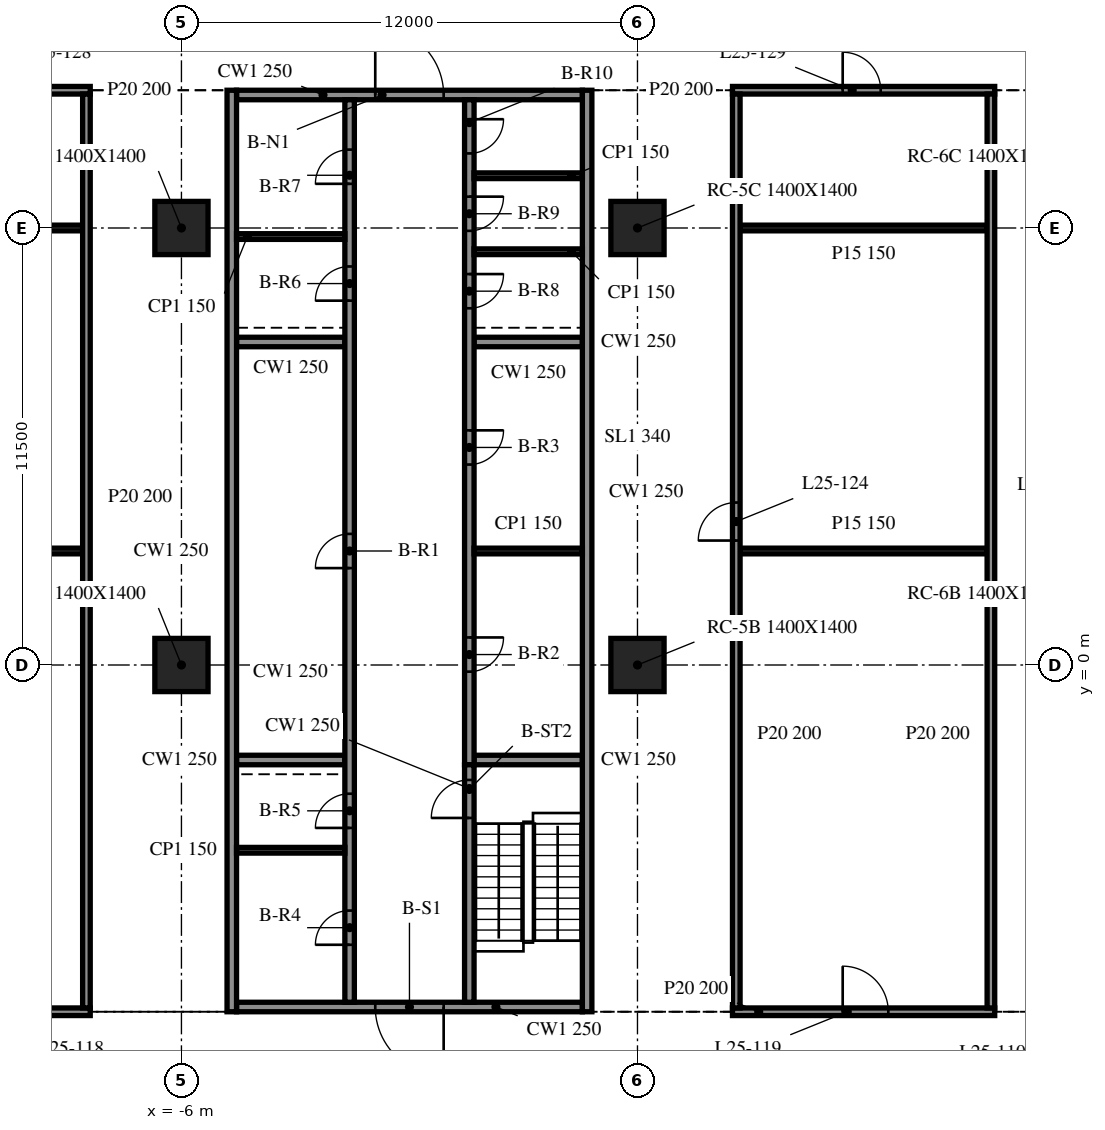
"""IFC4 building model, lengths in metres.
Left out: names, types, materials, properties, quantities, classifications, styles, units other than length and angle.
Written with IfcOpenShell. Run it as: python <this file> out.ifc"""

import sys

from ifc_helpers import new_model, si_unit, direction, frame, frame_2d, origin, origin_2d, place, context, subcontext, project, spatial, rectangle, extrude, element, fill, save


model = new_model("IFC4")
c1 = context("Model", 3, precision=1e-05, world=origin(), true_north=direction((0.0, 1.0)))
c2 = subcontext(c1, "Body", "Model", "MODEL_VIEW")
j1 = project(units=[si_unit("LENGTHUNIT", "METRE"), si_unit("PLANEANGLEUNIT", "RADIAN")], contexts=[c1])
p1 = place(None, origin())
s1 = spatial("IfcSite", under=j1, at=p1, CompositionType="ELEMENT")
p2 = place(p1, origin())
s2 = spatial("IfcBuilding", under=s1, at=p2, CompositionType="ELEMENT")
p3 = place(p2, frame((0.0, 0.0, 109.4)))
s3 = spatial("IfcBuildingStorey", under=s2, at=p3, CompositionType="ELEMENT", Elevation=109.4)
for number, where, z_axis, x_axis in (
    (1, (-6.0, 0.0, -0.34), (0.0, 0.0, 1.0), (1.0, 0.0, 0.0)),
    (2, (-6.0, 11.5, -0.34), (0.0, 0.0, 1.0), (1.0, 0.0, 0.0)),
    (3, (6.0, 0.0, -0.34), (0.0, 0.0, 1.0), (1.0, 0.0, 0.0)),
    (4, (6.0, 11.5, -0.34), (0.0, 0.0, 1.0), (1.0, 0.0, 0.0)),
):
    element("IfcColumn", number, at=place(p3, frame(where, z_axis=z_axis, x_axis=x_axis)), inside=s3, PredefinedType="COLUMN", context=c2, shape_type="SweptSolid", body=[
        extrude(rectangle(XDim=1.4, YDim=1.4, at=origin_2d()), origin(), (0.0, 0.0, 1.0), 4.1),
    ])
for number, where, z_axis, x_axis in (
    (5, (-4.675, 15.125, 0.0), (0.0, 0.0, 1.0), (0.0, -1.0, 0.0)),
    (6, (4.675, -9.125, 0.0), (0.0, 0.0, 1.0), (0.0, 1.0, 0.0)),
):
    element("IfcWall", number, at=place(p3, frame(where, z_axis=z_axis, x_axis=x_axis)), inside=s3, PredefinedType="SOLIDWALL", context=c2, shape_type="SweptSolid", body=[
        extrude(rectangle(XDim=24.25, YDim=0.25, at=frame_2d((12.125, 0.0))), origin(), (0.0, 0.0, 1.0), 3.76),
    ])
p4 = place(p3, frame((4.55, -9.0, 0.0), z_axis=(0.0, 0.0, 1.0), x_axis=(-1.0, 0.0, 0.0)))
e7 = element("IfcWall", 7, at=p4, inside=s3, PredefinedType="SOLIDWALL", context=c2, shape_type="SweptSolid", body=[
    extrude(rectangle(XDim=9.1, YDim=0.25, at=frame_2d((4.55, 0.0))), origin(), (0.0, 0.0, 1.0), 3.76),
])
p5 = place(p4, frame((3.65, 0.0, 0.0)))
e8 = element("IfcOpeningElement", 8, at=p5, cuts=e7, PredefinedType="OPENING", context=c2, shape_type="SweptSolid", body=[
    extrude(rectangle(XDim=1.8, YDim=2.1, at=frame_2d((0.9, 1.05))), frame((0.0, 0.135, 0.0), z_axis=(0.0, -1.0, 0.0), x_axis=(1.0, 0.0, 0.0)), (0.0, 0.0, 1.0), 0.27),
])
p6 = place(p3, frame((-4.55, 15.0, 0.0), z_axis=(0.0, 0.0, 1.0), x_axis=(1.0, 0.0, 0.0)))
e9 = element("IfcWall", 9, at=p6, inside=s3, PredefinedType="SOLIDWALL", context=c2, shape_type="SweptSolid", body=[
    extrude(rectangle(XDim=9.1, YDim=0.25, at=frame_2d((4.55, 0.0))), origin(), (0.0, 0.0, 1.0), 3.76),
])
p7 = place(p6, frame((3.65, 0.0, 0.0)))
e10 = element("IfcOpeningElement", 10, at=p7, cuts=e9, PredefinedType="OPENING", context=c2, shape_type="SweptSolid", body=[
    extrude(rectangle(XDim=1.8, YDim=2.1, at=frame_2d((0.9, 1.05))), frame((0.0, 0.135, 0.0), z_axis=(0.0, -1.0, 0.0), x_axis=(1.0, 0.0, 0.0)), (0.0, 0.0, 1.0), 0.27),
])
p8 = place(p3, frame((-1.575, -8.875, 0.0), z_axis=(0.0, 0.0, 1.0), x_axis=(0.0, 1.0, 0.0)))
e11 = element("IfcWall", 11, at=p8, inside=s3, PredefinedType="SOLIDWALL", context=c2, shape_type="SweptSolid", body=[
    extrude(rectangle(XDim=23.75, YDim=0.25, at=frame_2d((11.875, 0.0))), origin(), (0.0, 0.0, 1.0), 3.76),
])
p9 = place(p8, frame((11.425, 0.0, 0.0)))
e12 = element("IfcOpeningElement", 12, at=p9, cuts=e11, PredefinedType="OPENING", context=c2, shape_type="SweptSolid", body=[
    extrude(rectangle(XDim=0.9, YDim=2.1, at=frame_2d((0.45, 1.05))), frame((0.0, 0.135, 0.0), z_axis=(0.0, -1.0, 0.0), x_axis=(1.0, 0.0, 0.0)), (0.0, 0.0, 1.0), 0.27),
])
p10 = place(p8, frame((1.512, 0.0, 0.0)))
e13 = element("IfcOpeningElement", 13, at=p10, cuts=e11, PredefinedType="OPENING", context=c2, shape_type="SweptSolid", body=[
    extrude(rectangle(XDim=0.9, YDim=2.1, at=frame_2d((0.45, 1.05))), frame((0.0, 0.135, 0.0), z_axis=(0.0, -1.0, 0.0), x_axis=(1.0, 0.0, 0.0)), (0.0, 0.0, 1.0), 0.27),
])
p11 = place(p8, frame((4.587, 0.0, 0.0)))
e14 = element("IfcOpeningElement", 14, at=p11, cuts=e11, PredefinedType="OPENING", context=c2, shape_type="SweptSolid", body=[
    extrude(rectangle(XDim=0.9, YDim=2.1, at=frame_2d((0.45, 1.05))), frame((0.0, 0.135, 0.0), z_axis=(0.0, -1.0, 0.0), x_axis=(1.0, 0.0, 0.0)), (0.0, 0.0, 1.0), 0.27),
])
p12 = place(p8, frame((18.462, 0.0, 0.0)))
e15 = element("IfcOpeningElement", 15, at=p12, cuts=e11, PredefinedType="OPENING", context=c2, shape_type="SweptSolid", body=[
    extrude(rectangle(XDim=0.9, YDim=2.1, at=frame_2d((0.45, 1.05))), frame((0.0, 0.135, 0.0), z_axis=(0.0, -1.0, 0.0), x_axis=(1.0, 0.0, 0.0)), (0.0, 0.0, 1.0), 0.27),
])
p13 = place(p8, frame((21.538, 0.0, 0.0)))
e16 = element("IfcOpeningElement", 16, at=p13, cuts=e11, PredefinedType="OPENING", context=c2, shape_type="SweptSolid", body=[
    extrude(rectangle(XDim=0.9, YDim=2.1, at=frame_2d((0.45, 1.05))), frame((0.0, 0.135, 0.0), z_axis=(0.0, -1.0, 0.0), x_axis=(1.0, 0.0, 0.0)), (0.0, 0.0, 1.0), 0.27),
])
p14 = place(p3, frame((1.575, -8.875, 0.0), z_axis=(0.0, 0.0, 1.0), x_axis=(0.0, 1.0, 0.0)))
e17 = element("IfcWall", 17, at=p14, inside=s3, PredefinedType="SOLIDWALL", context=c2, shape_type="SweptSolid", body=[
    extrude(rectangle(XDim=6.25, YDim=0.25, at=frame_2d((3.125, 0.0))), origin(), (0.0, 0.0, 1.0), 3.76),
])
p15 = place(p14, frame((4.85, 0.0, 0.0)))
e18 = element("IfcOpeningElement", 18, at=p15, cuts=e17, PredefinedType="OPENING", context=c2, shape_type="SweptSolid", body=[
    extrude(rectangle(XDim=1.0, YDim=2.1, at=frame_2d((0.5, 1.05))), frame((0.0, 0.135, 0.0), z_axis=(0.0, -1.0, 0.0), x_axis=(1.0, 0.0, 0.0)), (0.0, 0.0, 1.0), 0.27),
])
p16 = place(p3, frame((1.575, 14.875, 0.0), z_axis=(0.0, 0.0, 1.0), x_axis=(0.0, -1.0, 0.0)))
e19 = element("IfcWall", 19, at=p16, inside=s3, PredefinedType="SOLIDWALL", context=c2, shape_type="SweptSolid", body=[
    extrude(rectangle(XDim=17.5, YDim=0.25, at=frame_2d((8.75, 0.0))), origin(), (0.0, 0.0, 1.0), 3.76),
])
p17 = place(p16, frame((14.15, 0.0, 0.0)))
e20 = element("IfcOpeningElement", 20, at=p17, cuts=e19, PredefinedType="OPENING", context=c2, shape_type="SweptSolid", body=[
    extrude(rectangle(XDim=0.9, YDim=2.1, at=frame_2d((0.45, 1.05))), frame((0.0, 0.135, 0.0), z_axis=(0.0, -1.0, 0.0), x_axis=(1.0, 0.0, 0.0)), (0.0, 0.0, 1.0), 0.27),
])
p18 = place(p16, frame((8.7, 0.0, 0.0)))
e21 = element("IfcOpeningElement", 21, at=p18, cuts=e19, PredefinedType="OPENING", context=c2, shape_type="SweptSolid", body=[
    extrude(rectangle(XDim=0.9, YDim=2.1, at=frame_2d((0.45, 1.05))), frame((0.0, 0.135, 0.0), z_axis=(0.0, -1.0, 0.0), x_axis=(1.0, 0.0, 0.0)), (0.0, 0.0, 1.0), 0.27),
])
p19 = place(p16, frame((4.587, 0.0, 0.0)))
e22 = element("IfcOpeningElement", 22, at=p19, cuts=e19, PredefinedType="OPENING", context=c2, shape_type="SweptSolid", body=[
    extrude(rectangle(XDim=0.9, YDim=2.1, at=frame_2d((0.45, 1.05))), frame((0.0, 0.135, 0.0), z_axis=(0.0, -1.0, 0.0), x_axis=(1.0, 0.0, 0.0)), (0.0, 0.0, 1.0), 0.27),
])
p20 = place(p16, frame((2.55, 0.0, 0.0)))
e23 = element("IfcOpeningElement", 23, at=p20, cuts=e19, PredefinedType="OPENING", context=c2, shape_type="SweptSolid", body=[
    extrude(rectangle(XDim=0.9, YDim=2.1, at=frame_2d((0.45, 1.05))), frame((0.0, 0.135, 0.0), z_axis=(0.0, -1.0, 0.0), x_axis=(1.0, 0.0, 0.0)), (0.0, 0.0, 1.0), 0.27),
])
p21 = place(p16, frame((0.512, 0.0, 0.0)))
e24 = element("IfcOpeningElement", 24, at=p21, cuts=e19, PredefinedType="OPENING", context=c2, shape_type="SweptSolid", body=[
    extrude(rectangle(XDim=0.9, YDim=2.1, at=frame_2d((0.45, 1.05))), frame((0.0, 0.135, 0.0), z_axis=(0.0, -1.0, 0.0), x_axis=(1.0, 0.0, 0.0)), (0.0, 0.0, 1.0), 0.27),
])
for number, where, z_axis, x_axis in (
    (25, (-4.55, -2.5, 0.0), (0.0, 0.0, 1.0), (1.0, 0.0, 0.0)),
    (26, (-4.55, 8.5, 0.0), (0.0, 0.0, 1.0), (1.0, 0.0, 0.0)),
    (27, (1.7, -2.5, 0.0), (0.0, 0.0, 1.0), (1.0, 0.0, 0.0)),
    (28, (1.7, 8.5, 0.0), (0.0, 0.0, 1.0), (1.0, 0.0, 0.0)),
):
    element("IfcWall", number, at=place(p3, frame(where, z_axis=z_axis, x_axis=x_axis)), inside=s3, PredefinedType="SOLIDWALL", context=c2, shape_type="SweptSolid", body=[
        extrude(rectangle(XDim=2.85, YDim=0.25, at=frame_2d((1.425, 0.0))), origin(), (0.0, 0.0, 1.0), 3.76),
    ])
for number, where, z_axis, x_axis in (
    (29, (1.7, 3.0, 0.0), (0.0, 0.0, 1.0), (1.0, 0.0, 0.0)),
    (30, (-4.55, -4.875, 0.0), (0.0, 0.0, 1.0), (1.0, 0.0, 0.0)),
    (31, (-4.55, 11.275, 0.0), (0.0, 0.0, 1.0), (1.0, 0.0, 0.0)),
    (32, (1.7, 10.875, 0.0), (0.0, 0.0, 1.0), (1.0, 0.0, 0.0)),
    (33, (1.7, 12.875, 0.0), (0.0, 0.0, 1.0), (1.0, 0.0, 0.0)),
):
    element("IfcWall", number, at=place(p3, frame(where, z_axis=z_axis, x_axis=x_axis)), inside=s3, PredefinedType="PARTITIONING", context=c2, shape_type="SweptSolid", body=[
        extrude(rectangle(XDim=2.85, YDim=0.15, at=frame_2d((1.425, 0.0))), origin(), (0.0, 0.0, 1.0), 3.76),
    ])
p22 = place(p3, frame((-15.7, -9.125, 0.0), z_axis=(0.0, 0.0, 1.0), x_axis=(1.0, 0.0, 0.0)))
e34 = element("IfcWall", 34, at=p22, inside=s3, PredefinedType="PARTITIONING", context=c2, shape_type="SweptSolid", body=[
    extrude(rectangle(XDim=7.3, YDim=0.2, at=frame_2d((3.65, 0.0))), origin(), (0.0, 0.0, 1.0), 3.76),
])
p23 = place(p22, frame((3.1, 0.0, 0.0)))
e35 = element("IfcOpeningElement", 35, at=p23, cuts=e34, PredefinedType="OPENING", context=c2, shape_type="SweptSolid", body=[
    extrude(rectangle(XDim=1.2, YDim=2.1, at=frame_2d((0.6, 1.05))), frame((0.0, 0.11, 0.0), z_axis=(0.0, -1.0, 0.0), x_axis=(1.0, 0.0, 0.0)), (0.0, 0.0, 1.0), 0.22),
])
p24 = place(p3, frame((8.5, -9.125, 0.0), z_axis=(0.0, 0.0, 1.0), x_axis=(1.0, 0.0, 0.0)))
e36 = element("IfcWall", 36, at=p24, inside=s3, PredefinedType="PARTITIONING", context=c2, shape_type="SweptSolid", body=[
    extrude(rectangle(XDim=6.9, YDim=0.2, at=frame_2d((3.45, 0.0))), origin(), (0.0, 0.0, 1.0), 3.76),
])
p25 = place(p24, frame((2.9, 0.0, 0.0)))
e37 = element("IfcOpeningElement", 37, at=p25, cuts=e36, PredefinedType="OPENING", context=c2, shape_type="SweptSolid", body=[
    extrude(rectangle(XDim=1.2, YDim=2.1, at=frame_2d((0.6, 1.05))), frame((0.0, 0.11, 0.0), z_axis=(0.0, -1.0, 0.0), x_axis=(1.0, 0.0, 0.0)), (0.0, 0.0, 1.0), 0.22),
])
p26 = place(p3, frame((-15.5, 3.0, 0.0), z_axis=(0.0, 0.0, 1.0), x_axis=(1.0, 0.0, 0.0)))
e38 = element("IfcWall", 38, at=p26, inside=s3, PredefinedType="PARTITIONING", context=c2, shape_type="SweptSolid", body=[
    extrude(rectangle(XDim=6.9, YDim=0.15, at=frame_2d((3.45, 0.0))), origin(), (0.0, 0.0, 1.0), 3.76),
])
p27 = place(p3, frame((8.7, 3.0, 0.0), z_axis=(0.0, 0.0, 1.0), x_axis=(1.0, 0.0, 0.0)))
e39 = element("IfcWall", 39, at=p27, inside=s3, PredefinedType="PARTITIONING", context=c2, shape_type="SweptSolid", body=[
    extrude(rectangle(XDim=6.5, YDim=0.15, at=frame_2d((3.25, 0.0))), origin(), (0.0, 0.0, 1.0), 3.76),
])
p28 = place(p3, frame((-15.5, 11.5, 0.0), z_axis=(0.0, 0.0, 1.0), x_axis=(1.0, 0.0, 0.0)))
e40 = element("IfcWall", 40, at=p28, inside=s3, PredefinedType="PARTITIONING", context=c2, shape_type="SweptSolid", body=[
    extrude(rectangle(XDim=6.9, YDim=0.15, at=frame_2d((3.45, 0.0))), origin(), (0.0, 0.0, 1.0), 3.76),
])
p29 = place(p3, frame((8.7, 11.5, 0.0), z_axis=(0.0, 0.0, 1.0), x_axis=(1.0, 0.0, 0.0)))
e41 = element("IfcWall", 41, at=p29, inside=s3, PredefinedType="PARTITIONING", context=c2, shape_type="SweptSolid", body=[
    extrude(rectangle(XDim=6.5, YDim=0.15, at=frame_2d((3.25, 0.0))), origin(), (0.0, 0.0, 1.0), 3.76),
])
p30 = place(p3, frame((-15.7, 15.125, 0.0), z_axis=(0.0, 0.0, 1.0), x_axis=(1.0, 0.0, 0.0)))
e42 = element("IfcWall", 42, at=p30, inside=s3, PredefinedType="PARTITIONING", context=c2, shape_type="SweptSolid", body=[
    extrude(rectangle(XDim=7.3, YDim=0.2, at=frame_2d((3.65, 0.0))), origin(), (0.0, 0.0, 1.0), 3.76),
])
p31 = place(p30, frame((3.1, 0.0, 0.0)))
e43 = element("IfcOpeningElement", 43, at=p31, cuts=e42, PredefinedType="OPENING", context=c2, shape_type="SweptSolid", body=[
    extrude(rectangle(XDim=1.0, YDim=2.1, at=frame_2d((0.5, 1.05))), frame((0.0, 0.11, 0.0), z_axis=(0.0, -1.0, 0.0), x_axis=(1.0, 0.0, 0.0)), (0.0, 0.0, 1.0), 0.22),
])
p32 = place(p3, frame((8.5, 15.125, 0.0), z_axis=(0.0, 0.0, 1.0), x_axis=(1.0, 0.0, 0.0)))
e44 = element("IfcWall", 44, at=p32, inside=s3, PredefinedType="PARTITIONING", context=c2, shape_type="SweptSolid", body=[
    extrude(rectangle(XDim=6.9, YDim=0.2, at=frame_2d((3.45, 0.0))), origin(), (0.0, 0.0, 1.0), 3.76),
])
p33 = place(p32, frame((2.9, 0.0, 0.0)))
e45 = element("IfcOpeningElement", 45, at=p33, cuts=e44, PredefinedType="OPENING", context=c2, shape_type="SweptSolid", body=[
    extrude(rectangle(XDim=1.0, YDim=2.1, at=frame_2d((0.5, 1.05))), frame((0.0, 0.11, 0.0), z_axis=(0.0, -1.0, 0.0), x_axis=(1.0, 0.0, 0.0)), (0.0, 0.0, 1.0), 0.22),
])
p34 = place(p3, frame((-8.5, -9.025, 0.0), z_axis=(0.0, 0.0, 1.0), x_axis=(0.0, 1.0, 0.0)))
e46 = element("IfcWall", 46, at=p34, inside=s3, PredefinedType="PARTITIONING", context=c2, shape_type="SweptSolid", body=[
    extrude(rectangle(XDim=24.05, YDim=0.2, at=frame_2d((12.025, 0.0))), origin(), (0.0, 0.0, 1.0), 3.76),
])
p35 = place(p3, frame((8.6, -9.025, 0.0), z_axis=(0.0, 0.0, 1.0), x_axis=(0.0, 1.0, 0.0)))
e47 = element("IfcWall", 47, at=p35, inside=s3, PredefinedType="PARTITIONING", context=c2, shape_type="SweptSolid", body=[
    extrude(rectangle(XDim=24.05, YDim=0.2, at=frame_2d((12.025, 0.0))), origin(), (0.0, 0.0, 1.0), 3.76),
])
p36 = place(p35, frame((12.3, 0.0, 0.0)))
e48 = element("IfcOpeningElement", 48, at=p36, cuts=e47, PredefinedType="OPENING", context=c2, shape_type="SweptSolid", body=[
    extrude(rectangle(XDim=1.0, YDim=2.1, at=frame_2d((0.5, 1.05))), frame((0.0, 0.11, 0.0), z_axis=(0.0, -1.0, 0.0), x_axis=(1.0, 0.0, 0.0)), (0.0, 0.0, 1.0), 0.22),
])
p37 = place(p3, frame((15.3, -9.025, 0.0), z_axis=(0.0, 0.0, 1.0), x_axis=(0.0, 1.0, 0.0)))
e49 = element("IfcWall", 49, at=p37, inside=s3, PredefinedType="PARTITIONING", context=c2, shape_type="SweptSolid", body=[
    extrude(rectangle(XDim=24.05, YDim=0.2, at=frame_2d((12.025, 0.0))), origin(), (0.0, 0.0, 1.0), 3.76),
])
p38 = place(p5, origin())
e50 = element("IfcDoor", 50, at=p38, inside=s3, OperationType="DOUBLE_DOOR_SINGLE_SWING", PredefinedType="DOOR", context=c2, shape_type="SweptSolid", body=[
    extrude(rectangle(XDim=1.8, YDim=2.1, at=frame_2d((0.9, 1.05))), frame((0.0, 0.025, 0.0), z_axis=(0.0, -1.0, 0.0), x_axis=(1.0, 0.0, 0.0)), (0.0, 0.0, 1.0), 0.05),
])
fill(e8, e50)
p39 = place(p7, origin())
e51 = element("IfcDoor", 51, at=p39, inside=s3, OperationType="DOUBLE_DOOR_SINGLE_SWING", PredefinedType="DOOR", context=c2, shape_type="SweptSolid", body=[
    extrude(rectangle(XDim=1.8, YDim=2.1, at=frame_2d((0.9, 1.05))), frame((0.0, 0.025, 0.0), z_axis=(0.0, -1.0, 0.0), x_axis=(1.0, 0.0, 0.0)), (0.0, 0.0, 1.0), 0.05),
])
fill(e10, e51)
p40 = place(p9, origin())
e52 = element("IfcDoor", 52, at=p40, inside=s3, OperationType="SINGLE_SWING_LEFT", PredefinedType="DOOR", context=c2, shape_type="SweptSolid", body=[
    extrude(rectangle(XDim=0.9, YDim=2.1, at=frame_2d((0.45, 1.05))), frame((0.0, 0.025, 0.0), z_axis=(0.0, -1.0, 0.0), x_axis=(1.0, 0.0, 0.0)), (0.0, 0.0, 1.0), 0.05),
])
fill(e12, e52)
p41 = place(p17, origin())
e53 = element("IfcDoor", 53, at=p41, inside=s3, OperationType="SINGLE_SWING_RIGHT", PredefinedType="DOOR", context=c2, shape_type="SweptSolid", body=[
    extrude(rectangle(XDim=0.9, YDim=2.1, at=frame_2d((0.45, 1.05))), frame((0.0, 0.025, 0.0), z_axis=(0.0, -1.0, 0.0), x_axis=(1.0, 0.0, 0.0)), (0.0, 0.0, 1.0), 0.05),
])
fill(e20, e53)
p42 = place(p18, origin())
e54 = element("IfcDoor", 54, at=p42, inside=s3, OperationType="SINGLE_SWING_LEFT", PredefinedType="DOOR", context=c2, shape_type="SweptSolid", body=[
    extrude(rectangle(XDim=0.9, YDim=2.1, at=frame_2d((0.45, 1.05))), frame((0.0, 0.025, 0.0), z_axis=(0.0, -1.0, 0.0), x_axis=(1.0, 0.0, 0.0)), (0.0, 0.0, 1.0), 0.05),
])
fill(e21, e54)
p43 = place(p10, origin())
e55 = element("IfcDoor", 55, at=p43, inside=s3, OperationType="SINGLE_SWING_RIGHT", PredefinedType="DOOR", context=c2, shape_type="SweptSolid", body=[
    extrude(rectangle(XDim=0.9, YDim=2.1, at=frame_2d((0.45, 1.05))), frame((0.0, 0.025, 0.0), z_axis=(0.0, -1.0, 0.0), x_axis=(1.0, 0.0, 0.0)), (0.0, 0.0, 1.0), 0.05),
])
fill(e13, e55)
p44 = place(p11, origin())
e56 = element("IfcDoor", 56, at=p44, inside=s3, OperationType="SINGLE_SWING_LEFT", PredefinedType="DOOR", context=c2, shape_type="SweptSolid", body=[
    extrude(rectangle(XDim=0.9, YDim=2.1, at=frame_2d((0.45, 1.05))), frame((0.0, 0.025, 0.0), z_axis=(0.0, -1.0, 0.0), x_axis=(1.0, 0.0, 0.0)), (0.0, 0.0, 1.0), 0.05),
])
fill(e14, e56)
p45 = place(p12, origin())
e57 = element("IfcDoor", 57, at=p45, inside=s3, OperationType="SINGLE_SWING_RIGHT", PredefinedType="DOOR", context=c2, shape_type="SweptSolid", body=[
    extrude(rectangle(XDim=0.9, YDim=2.1, at=frame_2d((0.45, 1.05))), frame((0.0, 0.025, 0.0), z_axis=(0.0, -1.0, 0.0), x_axis=(1.0, 0.0, 0.0)), (0.0, 0.0, 1.0), 0.05),
])
fill(e15, e57)
p46 = place(p13, origin())
e58 = element("IfcDoor", 58, at=p46, inside=s3, OperationType="SINGLE_SWING_LEFT", PredefinedType="DOOR", context=c2, shape_type="SweptSolid", body=[
    extrude(rectangle(XDim=0.9, YDim=2.1, at=frame_2d((0.45, 1.05))), frame((0.0, 0.025, 0.0), z_axis=(0.0, -1.0, 0.0), x_axis=(1.0, 0.0, 0.0)), (0.0, 0.0, 1.0), 0.05),
])
fill(e16, e58)
p47 = place(p19, origin())
e59 = element("IfcDoor", 59, at=p47, inside=s3, OperationType="SINGLE_SWING_RIGHT", PredefinedType="DOOR", context=c2, shape_type="SweptSolid", body=[
    extrude(rectangle(XDim=0.9, YDim=2.1, at=frame_2d((0.45, 1.05))), frame((0.0, 0.025, 0.0), z_axis=(0.0, -1.0, 0.0), x_axis=(1.0, 0.0, 0.0)), (0.0, 0.0, 1.0), 0.05),
])
fill(e22, e59)
p48 = place(p20, origin())
e60 = element("IfcDoor", 60, at=p48, inside=s3, OperationType="SINGLE_SWING_LEFT", PredefinedType="DOOR", context=c2, shape_type="SweptSolid", body=[
    extrude(rectangle(XDim=0.9, YDim=2.1, at=frame_2d((0.45, 1.05))), frame((0.0, 0.025, 0.0), z_axis=(0.0, -1.0, 0.0), x_axis=(1.0, 0.0, 0.0)), (0.0, 0.0, 1.0), 0.05),
])
fill(e23, e60)
p49 = place(p21, origin())
e61 = element("IfcDoor", 61, at=p49, inside=s3, OperationType="SINGLE_SWING_RIGHT", PredefinedType="DOOR", context=c2, shape_type="SweptSolid", body=[
    extrude(rectangle(XDim=0.9, YDim=2.1, at=frame_2d((0.45, 1.05))), frame((0.0, 0.025, 0.0), z_axis=(0.0, -1.0, 0.0), x_axis=(1.0, 0.0, 0.0)), (0.0, 0.0, 1.0), 0.05),
])
fill(e24, e61)
p50 = place(p15, origin())
e62 = element("IfcDoor", 62, at=p50, inside=s3, OperationType="SINGLE_SWING_LEFT", PredefinedType="DOOR", context=c2, shape_type="SweptSolid", body=[
    extrude(rectangle(XDim=1.0, YDim=2.1, at=frame_2d((0.5, 1.05))), frame((0.0, 0.025, 0.0), z_axis=(0.0, -1.0, 0.0), x_axis=(1.0, 0.0, 0.0)), (0.0, 0.0, 1.0), 0.05),
])
fill(e18, e62)
p51 = place(p25, origin())
e63 = element("IfcDoor", 63, at=p51, inside=s3, OperationType="SINGLE_SWING_RIGHT", PredefinedType="DOOR", context=c2, shape_type="SweptSolid", body=[
    extrude(rectangle(XDim=1.2, YDim=2.1, at=frame_2d((0.6, 1.05))), frame((0.0, 0.025, 0.0), z_axis=(0.0, -1.0, 0.0), x_axis=(1.0, 0.0, 0.0)), (0.0, 0.0, 1.0), 0.05),
])
fill(e37, e63)
p52 = place(p36, origin())
e64 = element("IfcDoor", 64, at=p52, inside=s3, OperationType="SINGLE_SWING_LEFT", PredefinedType="DOOR", context=c2, shape_type="SweptSolid", body=[
    extrude(rectangle(XDim=1.0, YDim=2.1, at=frame_2d((0.5, 1.05))), frame((0.0, 0.025, 0.0), z_axis=(0.0, -1.0, 0.0), x_axis=(1.0, 0.0, 0.0)), (0.0, 0.0, 1.0), 0.05),
])
fill(e48, e64)
p53 = place(p33, origin())
e65 = element("IfcDoor", 65, at=p53, inside=s3, OperationType="SINGLE_SWING_RIGHT", PredefinedType="DOOR", context=c2, shape_type="SweptSolid", body=[
    extrude(rectangle(XDim=1.0, YDim=2.1, at=frame_2d((0.5, 1.05))), frame((0.0, 0.025, 0.0), z_axis=(0.0, -1.0, 0.0), x_axis=(1.0, 0.0, 0.0)), (0.0, 0.0, 1.0), 0.05),
])
fill(e45, e65)
save(model, sys.argv[1])
